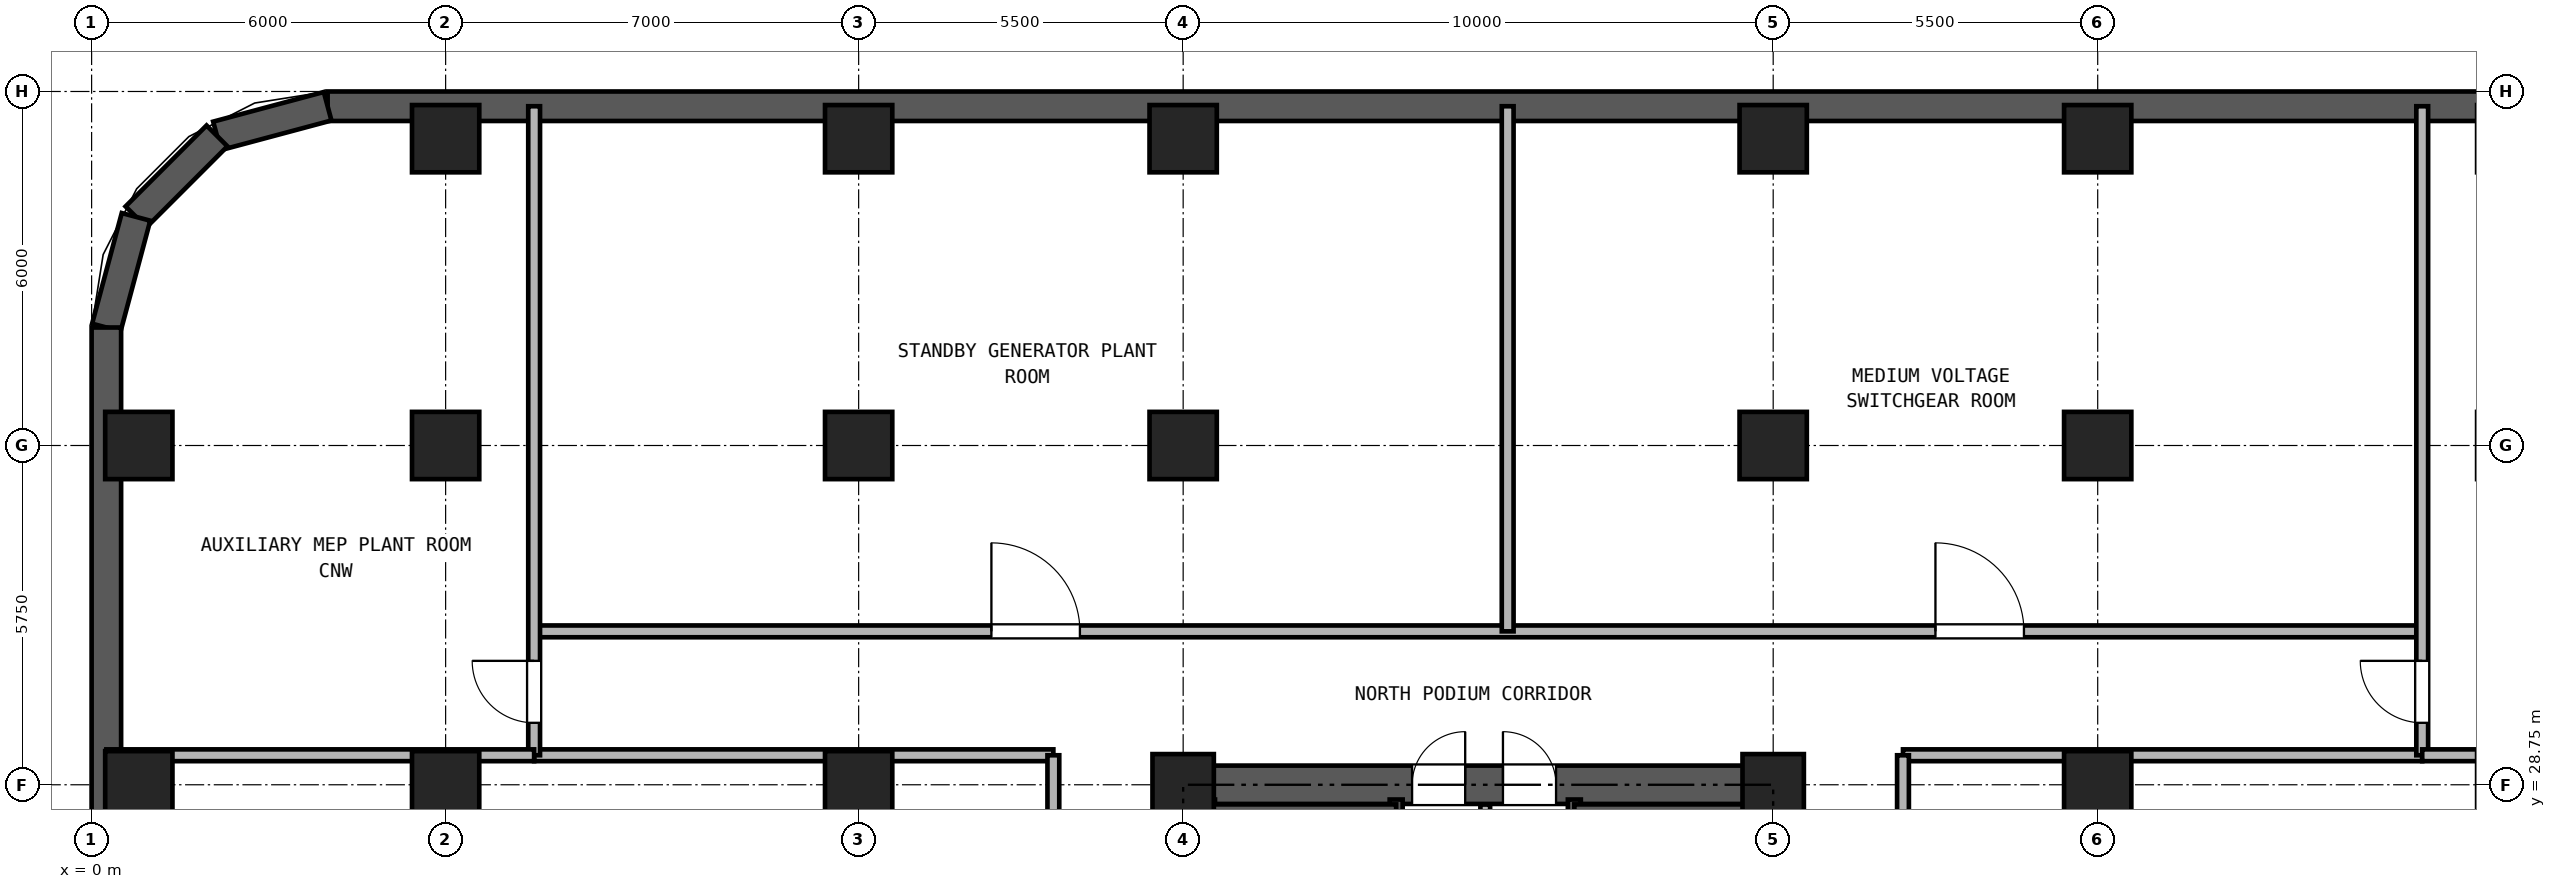
"""IFC4 building model, lengths in metres.
Left out: names, types, materials, properties, quantities, classifications, styles, units other than length and angle.
Written with IfcOpenShell. Run it as: python <this file> out.ifc"""

import sys

from ifc_helpers import new_model, si_unit, direction, frame, frame_2d, origin, origin_2d, place, context, subcontext, project, spatial, rectangle, hollow_rectangle, extrude, source, transform, mapped, element, fill, save


model = new_model("IFC4")
c1 = context("Model", 3, precision=1e-05, world=origin(), true_north=direction((0.0, 1.0)))
c2 = subcontext(c1, "Body", "Model", "MODEL_VIEW")
j1 = project(units=[si_unit("LENGTHUNIT", "METRE"), si_unit("PLANEANGLEUNIT", "RADIAN")], contexts=[c1])
p1 = place(None, origin())
s1 = spatial("IfcSite", under=j1, at=p1, CompositionType="ELEMENT")
p2 = place(p1, origin())
s2 = spatial("IfcBuilding", under=s1, at=p2, CompositionType="ELEMENT")
p3 = place(p2, frame((0.0, 0.0, -8.4)))
s3 = spatial("IfcBuildingStorey", under=s2, at=p3, CompositionType="ELEMENT", Elevation=-8.4)
m1 = source(origin(), c2, "Body", "SweptSolid", [
    extrude(hollow_rectangle(XDim=1.14, YDim=1.14, WallThickness=0.07, at=origin_2d()), origin(), (0.0, 0.0, 1.0), 3.88),
])
for number, where, z_axis, x_axis in (
    (1, (6.0, 39.7, 0.0), (0.0, 0.0, 1.0), (1.0, 0.0, 0.0)),
    (2, (13.0, 39.7, 0.0), (0.0, 0.0, 1.0), (1.0, 0.0, 0.0)),
    (3, (18.5, 39.7, 0.0), (0.0, 0.0, 1.0), (1.0, 0.0, 0.0)),
    (4, (28.5, 39.7, 0.0), (0.0, 0.0, 1.0), (1.0, 0.0, 0.0)),
    (5, (34.0, 39.7, 0.0), (0.0, 0.0, 1.0), (1.0, 0.0, 0.0)),
    (6, (0.8, 28.75, 0.0), (0.0, 0.0, 1.0), (1.0, 0.0, 0.0)),
    (7, (0.8, 34.5, 0.0), (0.0, 0.0, 1.0), (1.0, 0.0, 0.0)),
    (8, (6.0, 28.75, 0.0), (0.0, 0.0, 1.0), (1.0, 0.0, 0.0)),
    (9, (6.0, 34.5, 0.0), (0.0, 0.0, 1.0), (1.0, 0.0, 0.0)),
    (10, (13.0, 28.75, 0.0), (0.0, 0.0, 1.0), (1.0, 0.0, 0.0)),
    (11, (13.0, 34.5, 0.0), (0.0, 0.0, 1.0), (1.0, 0.0, 0.0)),
):
    element("IfcColumn", number, at=place(p3, frame(where, z_axis=z_axis, x_axis=x_axis)), inside=s3, PredefinedType="COLUMN", context=c2, shape_type="MappedRepresentation", body=[
        mapped(m1, transform((0.0, 0.0, 0.0), x_axis=(1.0, 0.0, 0.0), y_axis=(0.0, 1.0, 0.0), z_axis=(0.0, 0.0, 1.0), scale=1.0)),
    ])
m2 = source(origin(), c2, "Body", "SweptSolid", [
    extrude(hollow_rectangle(XDim=1.04, YDim=1.04, WallThickness=0.065, at=origin_2d()), origin(), (0.0, 0.0, 1.0), 3.88),
])
p4 = place(p3, frame((18.5, 28.75, 0.0), z_axis=(0.0, 0.0, 1.0), x_axis=(1.0, 0.0, 0.0)))
e12 = element("IfcColumn", 12, at=p4, inside=s3, PredefinedType="COLUMN", context=c2, shape_type="MappedRepresentation", body=[
    mapped(m2, transform((0.0, 0.0, 0.0), x_axis=(1.0, 0.0, 0.0), y_axis=(0.0, 1.0, 0.0), z_axis=(0.0, 0.0, 1.0), scale=1.0)),
])
p5 = place(p3, frame((18.5, 34.5, 0.0), z_axis=(0.0, 0.0, 1.0), x_axis=(1.0, 0.0, 0.0)))
e13 = element("IfcColumn", 13, at=p5, inside=s3, PredefinedType="COLUMN", context=c2, shape_type="MappedRepresentation", body=[
    mapped(m1, transform((0.0, 0.0, 0.0), x_axis=(1.0, 0.0, 0.0), y_axis=(0.0, 1.0, 0.0), z_axis=(0.0, 0.0, 1.0), scale=1.0)),
])
p6 = place(p3, frame((28.5, 28.75, 0.0), z_axis=(0.0, 0.0, 1.0), x_axis=(1.0, 0.0, 0.0)))
e14 = element("IfcColumn", 14, at=p6, inside=s3, PredefinedType="COLUMN", context=c2, shape_type="MappedRepresentation", body=[
    mapped(m2, transform((0.0, 0.0, 0.0), x_axis=(1.0, 0.0, 0.0), y_axis=(0.0, 1.0, 0.0), z_axis=(0.0, 0.0, 1.0), scale=1.0)),
])
for number, where, z_axis, x_axis in (
    (15, (28.5, 34.5, 0.0), (0.0, 0.0, 1.0), (1.0, 0.0, 0.0)),
    (16, (34.0, 28.75, 0.0), (0.0, 0.0, 1.0), (1.0, 0.0, 0.0)),
    (17, (34.0, 34.5, 0.0), (0.0, 0.0, 1.0), (1.0, 0.0, 0.0)),
):
    element("IfcColumn", number, at=place(p3, frame(where, z_axis=z_axis, x_axis=x_axis)), inside=s3, PredefinedType="COLUMN", context=c2, shape_type="MappedRepresentation", body=[
        mapped(m1, transform((0.0, 0.0, 0.0), x_axis=(1.0, 0.0, 0.0), y_axis=(0.0, 1.0, 0.0), z_axis=(0.0, 0.0, 1.0), scale=1.0)),
    ])
p7 = place(p3, frame((43.0, 40.25, 0.0), z_axis=(0.0, 0.0, 1.0), x_axis=(-1.0, 0.0, 0.0)))
e18 = element("IfcWall", 18, at=p7, inside=s3, PredefinedType="USERDEFINED", context=c2, shape_type="SweptSolid", body=[
    extrude(rectangle(XDim=39.0, YDim=0.5, at=frame_2d((19.5, 0.0))), origin(), (0.0, 0.0, 1.0), 3.88),
])
for number, where, z_axis, x_axis in (
    (19, (4.0, 40.25, 0.0), (0.0, 0.0, 1.0), (-0.966, -0.259, 0.0)),
    (20, (2.125, 39.748, 0.0), (0.0, 0.0, 1.0), (-0.707, -0.707, 0.0)),
    (21, (0.752, 38.375, 0.0), (0.0, 0.0, 1.0), (-0.259, -0.966, 0.0)),
):
    element("IfcWall", number, at=place(p3, frame(where, z_axis=z_axis, x_axis=x_axis)), inside=s3, PredefinedType="USERDEFINED", context=c2, shape_type="SweptSolid", body=[
        extrude(rectangle(XDim=1.941, YDim=0.5, at=frame_2d((0.971, 0.0))), origin(), (0.0, 0.0, 1.0), 3.88),
    ])
p8 = place(p3, frame((0.25, 36.5, 0.0), z_axis=(0.0, 0.0, 1.0), x_axis=(0.0, -1.0, 0.0)))
e22 = element("IfcWall", 22, at=p8, inside=s3, PredefinedType="USERDEFINED", context=c2, shape_type="SweptSolid", body=[
    extrude(rectangle(XDim=32.5, YDim=0.5, at=frame_2d((16.25, 0.0))), origin(), (0.0, 0.0, 1.0), 3.88),
])
p9 = place(p3, frame((18.175, 28.75, 0.0), z_axis=(0.0, 0.0, 1.0), x_axis=(1.0, 0.0, 0.0)))
e23 = element("IfcWall", 23, at=p9, inside=s3, PredefinedType="SHEAR", context=c2, shape_type="SweptSolid", body=[
    extrude(rectangle(XDim=10.65, YDim=0.65, at=frame_2d((5.325, 0.0))), origin(), (0.0, 0.0, 1.0), 3.88),
])
p10 = place(p9, frame((4.205, 0.0, 0.0)))
e24 = element("IfcOpeningElement", 24, at=p10, cuts=e23, PredefinedType="OPENING", context=c2, shape_type="SweptSolid", body=[
    extrude(rectangle(XDim=0.9, YDim=2.05, at=frame_2d((0.45, 1.025))), frame((0.0, 0.335, 0.0), z_axis=(0.0, -1.0, 0.0), x_axis=(1.0, 0.0, 0.0)), (0.0, 0.0, 1.0), 0.67),
])
p11 = place(p9, frame((5.745, 0.0, 0.0)))
e25 = element("IfcOpeningElement", 25, at=p11, cuts=e23, PredefinedType="OPENING", context=c2, shape_type="SweptSolid", body=[
    extrude(rectangle(XDim=0.9, YDim=2.05, at=frame_2d((0.45, 1.025))), frame((0.0, 0.335, 0.0), z_axis=(0.0, -1.0, 0.0), x_axis=(1.0, 0.0, 0.0)), (0.0, 0.0, 1.0), 0.67),
])
p12 = place(p3, frame((18.5, 11.825, 0.0), z_axis=(0.0, 0.0, 1.0), x_axis=(0.0, 1.0, 0.0)))
e26 = element("IfcWall", 26, at=p12, inside=s3, PredefinedType="SHEAR", context=c2, shape_type="SweptSolid", body=[
    extrude(rectangle(XDim=16.6, YDim=0.65, at=frame_2d((8.3, 0.0))), origin(), (0.0, 0.0, 1.0), 3.88),
])
p13 = place(p12, frame((7.325, 0.0, 0.0)))
e27 = element("IfcOpeningElement", 27, at=p13, cuts=e26, PredefinedType="OPENING", context=c2, shape_type="SweptSolid", body=[
    extrude(rectangle(XDim=1.15, YDim=2.2, at=frame_2d((0.575, 1.1))), frame((0.0, 0.335, 0.0), z_axis=(0.0, -1.0, 0.0), x_axis=(1.0, 0.0, 0.0)), (0.0, 0.0, 1.0), 0.67),
])
p14 = place(p3, frame((28.5, 11.825, 0.0), z_axis=(0.0, 0.0, 1.0), x_axis=(0.0, 1.0, 0.0)))
e28 = element("IfcWall", 28, at=p14, inside=s3, PredefinedType="SHEAR", context=c2, shape_type="SweptSolid", body=[
    extrude(rectangle(XDim=16.6, YDim=0.65, at=frame_2d((8.3, 0.0))), origin(), (0.0, 0.0, 1.0), 3.88),
])
p15 = place(p14, frame((7.325, 0.0, 0.0)))
e29 = element("IfcOpeningElement", 29, at=p15, cuts=e28, PredefinedType="OPENING", context=c2, shape_type="SweptSolid", body=[
    extrude(rectangle(XDim=1.15, YDim=2.2, at=frame_2d((0.575, 1.1))), frame((0.0, 0.335, 0.0), z_axis=(0.0, -1.0, 0.0), x_axis=(1.0, 0.0, 0.0)), (0.0, 0.0, 1.0), 0.67),
])
for number, where, z_axis, x_axis in (
    (30, (18.93, 21.39, 0.0), (0.0, 0.0, 1.0), (0.0, 1.0, 0.0)),
    (31, (22.11, 21.39, 0.0), (0.0, 0.0, 1.0), (0.0, 1.0, 0.0)),
    (32, (25.13, 21.39, 0.0), (0.0, 0.0, 1.0), (0.0, 1.0, 0.0)),
):
    element("IfcWall", number, at=place(p3, frame(where, z_axis=z_axis, x_axis=x_axis)), inside=s3, PredefinedType="SOLIDWALL", context=c2, shape_type="SweptSolid", body=[
        extrude(rectangle(XDim=7.11, YDim=0.22, at=frame_2d((3.555, 0.0))), origin(), (0.0, 0.0, 1.0), 3.88),
    ])
p16 = place(p3, frame((18.835, 28.335, 0.0), z_axis=(0.0, 0.0, 1.0), x_axis=(1.0, 0.0, 0.0)))
e33 = element("IfcWall", 33, at=p16, inside=s3, PredefinedType="PARTITIONING", context=c2, shape_type="SweptSolid", body=[
    extrude(rectangle(XDim=3.275, YDim=0.165, at=frame_2d((1.638, 0.0))), origin(), (0.0, 0.0, 1.0), 3.88),
])
p17 = place(p3, frame((25.13, 28.335, 0.0), z_axis=(0.0, 0.0, 1.0), x_axis=(1.0, 0.0, 0.0)))
e34 = element("IfcWall", 34, at=p17, inside=s3, PredefinedType="PARTITIONING", context=c2, shape_type="SweptSolid", body=[
    extrude(rectangle(XDim=3.035, YDim=0.165, at=frame_2d((1.518, 0.0))), origin(), (0.0, 0.0, 1.0), 3.88),
])
p18 = place(p3, frame((23.62, 24.4, 0.0), z_axis=(0.0, 0.0, 1.0), x_axis=(0.0, 1.0, 0.0)))
e35 = element("IfcWall", 35, at=p18, inside=s3, PredefinedType="PARTITIONING", context=c2, shape_type="SweptSolid", body=[
    extrude(rectangle(XDim=4.015, YDim=0.165, at=frame_2d((2.008, 0.0))), origin(), (0.0, 0.0, 1.0), 3.88),
])
p19 = place(p3, frame((7.5, 31.35, 0.0), z_axis=(0.0, 0.0, 1.0), x_axis=(1.0, 0.0, 0.0)))
e36 = element("IfcWall", 36, at=p19, inside=s3, PredefinedType="PARTITIONING", context=c2, shape_type="SweptSolid", body=[
    extrude(rectangle(XDim=32.0, YDim=0.2, at=frame_2d((16.0, 0.0))), origin(), (0.0, 0.0, 1.0), 3.88),
])
p20 = place(p19, frame((7.75, 0.0, 0.0)))
e37 = element("IfcOpeningElement", 37, at=p20, cuts=e36, PredefinedType="OPENING", context=c2, shape_type="SweptSolid", body=[
    extrude(rectangle(XDim=1.5, YDim=2.25, at=frame_2d((0.75, 1.125))), frame((0.0, 0.11, 0.0), z_axis=(0.0, -1.0, 0.0), x_axis=(1.0, 0.0, 0.0)), (0.0, 0.0, 1.0), 0.22),
])
p21 = place(p19, frame((23.75, 0.0, 0.0)))
e38 = element("IfcOpeningElement", 38, at=p21, cuts=e36, PredefinedType="OPENING", context=c2, shape_type="SweptSolid", body=[
    extrude(rectangle(XDim=1.5, YDim=2.25, at=frame_2d((0.75, 1.125))), frame((0.0, 0.11, 0.0), z_axis=(0.0, -1.0, 0.0), x_axis=(1.0, 0.0, 0.0)), (0.0, 0.0, 1.0), 0.22),
])
for number, where, z_axis, x_axis in (
    (39, (7.5, 29.25, 0.0), (0.0, 0.0, 1.0), (1.0, 0.0, 0.0)),
    (40, (30.7, 29.25, 0.0), (0.0, 0.0, 1.0), (1.0, 0.0, 0.0)),
):
    element("IfcWall", number, at=place(p3, frame(where, z_axis=z_axis, x_axis=x_axis)), inside=s3, PredefinedType="PARTITIONING", context=c2, shape_type="SweptSolid", body=[
        extrude(rectangle(XDim=8.8, YDim=0.2, at=frame_2d((4.4, 0.0))), origin(), (0.0, 0.0, 1.0), 3.88),
    ])
p22 = place(p3, frame((16.3, 11.0, 0.0), z_axis=(0.0, 0.0, 1.0), x_axis=(0.0, 1.0, 0.0)))
e41 = element("IfcWall", 41, at=p22, inside=s3, PredefinedType="PARTITIONING", context=c2, shape_type="SweptSolid", body=[
    extrude(rectangle(XDim=18.25, YDim=0.2, at=frame_2d((9.125, 0.0))), origin(), (0.0, 0.0, 1.0), 3.88),
])
p23 = place(p22, frame((4.25, 0.0, 0.0)))
e42 = element("IfcOpeningElement", 42, at=p23, cuts=e41, PredefinedType="OPENING", context=c2, shape_type="SweptSolid", body=[
    extrude(rectangle(XDim=0.95, YDim=2.15, at=frame_2d((0.475, 1.075))), frame((0.0, 0.11, 0.0), z_axis=(0.0, -1.0, 0.0), x_axis=(1.0, 0.0, 0.0)), (0.0, 0.0, 1.0), 0.22),
])
p24 = place(p22, frame((13.375, 0.0, 0.0)))
e43 = element("IfcOpeningElement", 43, at=p24, cuts=e41, PredefinedType="OPENING", context=c2, shape_type="SweptSolid", body=[
    extrude(rectangle(XDim=0.95, YDim=2.15, at=frame_2d((0.475, 1.075))), frame((0.0, 0.11, 0.0), z_axis=(0.0, -1.0, 0.0), x_axis=(1.0, 0.0, 0.0)), (0.0, 0.0, 1.0), 0.22),
])
p25 = place(p3, frame((30.7, 11.0, 0.0), z_axis=(0.0, 0.0, 1.0), x_axis=(0.0, 1.0, 0.0)))
e44 = element("IfcWall", 44, at=p25, inside=s3, PredefinedType="PARTITIONING", context=c2, shape_type="SweptSolid", body=[
    extrude(rectangle(XDim=18.25, YDim=0.2, at=frame_2d((9.125, 0.0))), origin(), (0.0, 0.0, 1.0), 3.88),
])
p26 = place(p25, frame((8.625, 0.0, 0.0)))
e45 = element("IfcOpeningElement", 45, at=p26, cuts=e44, PredefinedType="OPENING", context=c2, shape_type="SweptSolid", body=[
    extrude(rectangle(XDim=0.95, YDim=2.15, at=frame_2d((0.475, 1.075))), frame((0.0, 0.11, 0.0), z_axis=(0.0, -1.0, 0.0), x_axis=(1.0, 0.0, 0.0)), (0.0, 0.0, 1.0), 0.22),
])
p27 = place(p3, frame((7.5, 29.25, 0.0), z_axis=(0.0, 0.0, 1.0), x_axis=(0.0, 1.0, 0.0)))
e46 = element("IfcWall", 46, at=p27, inside=s3, PredefinedType="PARTITIONING", context=c2, shape_type="SweptSolid", body=[
    extrude(rectangle(XDim=11.0, YDim=0.2, at=frame_2d((5.5, 0.0))), origin(), (0.0, 0.0, 1.0), 3.88),
])
p28 = place(p27, frame((0.55, 0.0, 0.0)))
e47 = element("IfcOpeningElement", 47, at=p28, cuts=e46, PredefinedType="OPENING", context=c2, shape_type="SweptSolid", body=[
    extrude(rectangle(XDim=1.05, YDim=2.15, at=frame_2d((0.525, 1.075))), frame((0.0, 0.11, 0.0), z_axis=(0.0, -1.0, 0.0), x_axis=(1.0, 0.0, 0.0)), (0.0, 0.0, 1.0), 0.22),
])
p29 = place(p3, frame((39.5, 29.25, 0.0), z_axis=(0.0, 0.0, 1.0), x_axis=(0.0, 1.0, 0.0)))
e48 = element("IfcWall", 48, at=p29, inside=s3, PredefinedType="PARTITIONING", context=c2, shape_type="SweptSolid", body=[
    extrude(rectangle(XDim=11.0, YDim=0.2, at=frame_2d((5.5, 0.0))), origin(), (0.0, 0.0, 1.0), 3.88),
])
p30 = place(p29, frame((0.55, 0.0, 0.0)))
e49 = element("IfcOpeningElement", 49, at=p30, cuts=e48, PredefinedType="OPENING", context=c2, shape_type="SweptSolid", body=[
    extrude(rectangle(XDim=1.05, YDim=2.15, at=frame_2d((0.525, 1.075))), frame((0.0, 0.11, 0.0), z_axis=(0.0, -1.0, 0.0), x_axis=(1.0, 0.0, 0.0)), (0.0, 0.0, 1.0), 0.22),
])
for number, where, z_axis, x_axis in (
    (50, (0.25, 29.25, 0.0), (0.0, 0.0, 1.0), (1.0, 0.0, 0.0)),
    (51, (39.5, 29.25, 0.0), (0.0, 0.0, 1.0), (1.0, 0.0, 0.0)),
):
    element("IfcWall", number, at=place(p3, frame(where, z_axis=z_axis, x_axis=x_axis)), inside=s3, PredefinedType="PARTITIONING", context=c2, shape_type="SweptSolid", body=[
        extrude(rectangle(XDim=7.25, YDim=0.2, at=frame_2d((3.625, 0.0))), origin(), (0.0, 0.0, 1.0), 3.88),
    ])
p31 = place(p3, frame((24.0, 31.35, 0.0), z_axis=(0.0, 0.0, 1.0), x_axis=(0.0, 1.0, 0.0)))
e52 = element("IfcWall", 52, at=p31, inside=s3, PredefinedType="PARTITIONING", context=c2, shape_type="SweptSolid", body=[
    extrude(rectangle(XDim=8.9, YDim=0.2, at=frame_2d((4.45, 0.0))), origin(), (0.0, 0.0, 1.0), 3.88),
])
p32 = place(p10, origin())
e53 = element("IfcDoor", 53, at=p32, inside=s3, OperationType="SINGLE_SWING_RIGHT", PredefinedType="DOOR", context=c2, shape_type="SweptSolid", body=[
    extrude(rectangle(XDim=0.9, YDim=2.05, at=frame_2d((0.45, 1.025))), frame((0.0, 0.025, 0.0), z_axis=(0.0, -1.0, 0.0), x_axis=(1.0, 0.0, 0.0)), (0.0, 0.0, 1.0), 0.05),
])
fill(e24, e53)
p33 = place(p11, origin())
e54 = element("IfcDoor", 54, at=p33, inside=s3, OperationType="SINGLE_SWING_LEFT", PredefinedType="DOOR", context=c2, shape_type="SweptSolid", body=[
    extrude(rectangle(XDim=0.9, YDim=2.05, at=frame_2d((0.45, 1.025))), frame((0.0, 0.025, 0.0), z_axis=(0.0, -1.0, 0.0), x_axis=(1.0, 0.0, 0.0)), (0.0, 0.0, 1.0), 0.05),
])
fill(e25, e54)
p34 = place(p20, origin())
e55 = element("IfcDoor", 55, at=p34, inside=s3, OperationType="SINGLE_SWING_LEFT", PredefinedType="DOOR", context=c2, shape_type="SweptSolid", body=[
    extrude(rectangle(XDim=1.5, YDim=2.25, at=frame_2d((0.75, 1.125))), frame((0.0, 0.025, 0.0), z_axis=(0.0, -1.0, 0.0), x_axis=(1.0, 0.0, 0.0)), (0.0, 0.0, 1.0), 0.05),
])
fill(e37, e55)
p35 = place(p21, origin())
e56 = element("IfcDoor", 56, at=p35, inside=s3, OperationType="SINGLE_SWING_LEFT", PredefinedType="DOOR", context=c2, shape_type="SweptSolid", body=[
    extrude(rectangle(XDim=1.5, YDim=2.25, at=frame_2d((0.75, 1.125))), frame((0.0, 0.025, 0.0), z_axis=(0.0, -1.0, 0.0), x_axis=(1.0, 0.0, 0.0)), (0.0, 0.0, 1.0), 0.05),
])
fill(e38, e56)
p36 = place(p28, frame((1.05, 0.0, 0.0), z_axis=(0.0, 0.0, 1.0), x_axis=(-1.0, 0.0, 0.0)))
e57 = element("IfcDoor", 57, at=p36, inside=s3, OperationType="SINGLE_SWING_RIGHT", PredefinedType="DOOR", context=c2, shape_type="SweptSolid", body=[
    extrude(rectangle(XDim=1.05, YDim=2.15, at=frame_2d((0.525, 1.075))), frame((0.0, 0.025, 0.0), z_axis=(0.0, -1.0, 0.0), x_axis=(1.0, 0.0, 0.0)), (0.0, 0.0, 1.0), 0.05),
])
fill(e47, e57)
p37 = place(p30, origin())
e58 = element("IfcDoor", 58, at=p37, inside=s3, OperationType="SINGLE_SWING_RIGHT", PredefinedType="DOOR", context=c2, shape_type="SweptSolid", body=[
    extrude(rectangle(XDim=1.05, YDim=2.15, at=frame_2d((0.525, 1.075))), frame((0.0, 0.025, 0.0), z_axis=(0.0, -1.0, 0.0), x_axis=(1.0, 0.0, 0.0)), (0.0, 0.0, 1.0), 0.05),
])
fill(e49, e58)
save(model, sys.argv[1])
